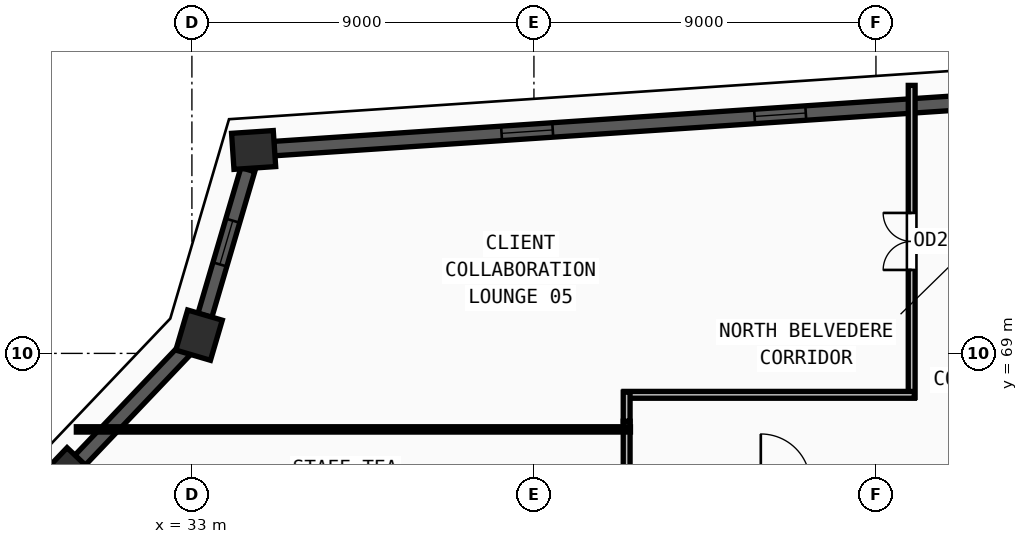
"""IFC4 building model, lengths in metres.
Left out: names, types, materials, properties, quantities, classifications, styles, units other than length and angle.
Written with IfcOpenShell. Run it as: python <this file> out.ifc"""

import sys

from ifc_helpers import new_model, si_unit, direction, frame, frame_2d, origin, origin_2d, place, context, subcontext, project, spatial, rectangle, extrude, source, transform, mapped, element, fill, save


model = new_model("IFC4")
c1 = context("Model", 3, precision=1e-05, world=origin(), true_north=direction((0.0, 1.0)))
c2 = subcontext(c1, "Body", "Model", "MODEL_VIEW")
j1 = project(units=[si_unit("LENGTHUNIT", "METRE"), si_unit("PLANEANGLEUNIT", "RADIAN")], contexts=[c1])
p1 = place(None, origin())
s1 = spatial("IfcSite", under=j1, at=p1, CompositionType="ELEMENT")
p2 = place(p1, origin())
s2 = spatial("IfcBuilding", under=s1, at=p2, CompositionType="ELEMENT")
p3 = place(p2, frame((0.0, 0.0, 297.75)))
s3 = spatial("IfcBuildingStorey", under=s2, at=p3, CompositionType="ELEMENT", Elevation=297.75)
m1 = source(origin(), c2, "Body", "SweptSolid", [
    extrude(rectangle(XDim=1.1, YDim=0.95, at=origin_2d()), origin(), (0.0, 0.0, 1.0), 3.75),
])
for number, where, z_axis, x_axis in (
    (1, (29.68, 65.793, 0.0), (0.0, 0.0, 1.0), (0.689, 0.724, 0.0)),
    (2, (33.188, 69.48, 0.0), (0.0, 0.0, 1.0), (0.283, 0.959, 0.0)),
    (3, (34.624, 74.353, 0.0), (0.0, 0.0, 1.0), (0.998, 0.067, 0.0)),
):
    element("IfcColumn", number, at=place(p3, frame(where, z_axis=z_axis, x_axis=x_axis)), inside=s3, PredefinedType="COLUMN", context=c2, shape_type="MappedRepresentation", body=[
        mapped(m1, transform((0.0, 0.0, 0.0), x_axis=(1.0, 0.0, 0.0), y_axis=(0.0, 1.0, 0.0), z_axis=(0.0, 0.0, 1.0), scale=1.0)),
    ])
p4 = place(p3, frame((61.797, 76.17, 0.0), z_axis=(0.0, 0.0, 1.0), x_axis=(-0.99777170169, -0.066720546358, 0.0)))
e4 = element("IfcWall", 4, at=p4, inside=s3, PredefinedType="SOLIDWALL", context=c2, shape_type="SweptSolid", body=[
    extrude(rectangle(XDim=26.694, YDim=0.38, at=frame_2d((13.347, 0.0))), origin(), (0.0, 0.0, 1.0), 3.57),
])
m2 = source(origin(), c2, "Body", "SweptSolid", [
    extrude(rectangle(XDim=1.35, YDim=1.85, at=frame_2d((0.675, 0.925))), frame((0.0, 0.2, 0.0), z_axis=(0.0, -1.0, 0.0), x_axis=(1.0, 0.0, 0.0)), (0.0, 0.0, 1.0), 0.4),
])
p5 = place(p4, frame((5.148, 0.0, 0.55)))
e5 = element("IfcOpeningElement", 5, at=p5, cuts=e4, PredefinedType="OPENING", context=c2, shape_type="MappedRepresentation", body=[
    mapped(m2, transform((0.0, 0.0, 0.0), x_axis=(1.0, 0.0, 0.0), y_axis=(0.0, 1.0, 0.0), z_axis=(0.0, 0.0, 1.0), scale=1.0)),
])
p6 = place(p4, frame((12.672, 0.0, 0.55)))
e6 = element("IfcOpeningElement", 6, at=p6, cuts=e4, PredefinedType="OPENING", context=c2, shape_type="MappedRepresentation", body=[
    mapped(m2, transform((0.0, 0.0, 0.0), x_axis=(1.0, 0.0, 0.0), y_axis=(0.0, 1.0, 0.0), z_axis=(0.0, 0.0, 1.0), scale=1.0)),
])
p7 = place(p4, frame((19.345, 0.0, 0.55)))
e7 = element("IfcOpeningElement", 7, at=p7, cuts=e4, PredefinedType="OPENING", context=c2, shape_type="MappedRepresentation", body=[
    mapped(m2, transform((0.0, 0.0, 0.0), x_axis=(1.0, 0.0, 0.0), y_axis=(0.0, 1.0, 0.0), z_axis=(0.0, 0.0, 1.0), scale=1.0)),
])
p8 = place(p3, frame((34.471, 73.835, 0.0), z_axis=(0.0, 0.0, 1.0), x_axis=(-0.282483550301, -0.959272142726, 0.0)))
e8 = element("IfcWall", 8, at=p8, inside=s3, PredefinedType="SOLIDWALL", context=c2, shape_type="SweptSolid", body=[
    extrude(rectangle(XDim=4.0, YDim=0.38, at=frame_2d((2.0, 0.0))), origin(), (0.0, 0.0, 1.0), 3.57),
])
m3 = source(origin(), c2, "Body", "SweptSolid", [
    extrude(rectangle(XDim=1.2, YDim=1.9, at=frame_2d((0.6, 0.95))), frame((0.0, 0.2, 0.0), z_axis=(0.0, -1.0, 0.0), x_axis=(1.0, 0.0, 0.0)), (0.0, 0.0, 1.0), 0.4),
])
p9 = place(p8, frame((1.4, 0.0, 0.55)))
e9 = element("IfcOpeningElement", 9, at=p9, cuts=e8, PredefinedType="OPENING", context=c2, shape_type="MappedRepresentation", body=[
    mapped(m3, transform((0.0, 0.0, 0.0), x_axis=(1.0, 0.0, 0.0), y_axis=(0.0, 1.0, 0.0), z_axis=(0.0, 0.0, 1.0), scale=1.0)),
])
p10 = place(p3, frame((32.816, 69.089, 0.0), z_axis=(0.0, 0.0, 1.0), x_axis=(-0.689291723618, -0.72448389889, 0.0)))
e10 = element("IfcWall", 10, at=p10, inside=s3, PredefinedType="SOLIDWALL", context=c2, shape_type="SweptSolid", body=[
    extrude(rectangle(XDim=4.01, YDim=0.38, at=frame_2d((2.005, 0.0))), origin(), (0.0, 0.0, 1.0), 3.57),
])
p11 = place(p3, frame((51.94, 67.84, 0.0), z_axis=(0.0, 0.0, 1.0), x_axis=(0.0, 1.0, 0.0)))
e11 = element("IfcWall", 11, at=p11, inside=s3, PredefinedType="PARTITIONING", context=c2, shape_type="SweptSolid", body=[
    extrude(rectangle(XDim=8.212, YDim=0.18, at=frame_2d((4.106, 0.0))), origin(), (0.0, 0.0, 1.0), 3.57),
])
m4 = source(origin(), c2, "Body", "SweptSolid", [
    extrude(rectangle(XDim=1.5, YDim=2.2, at=frame_2d((0.75, 1.1))), frame((0.0, 0.1, 0.0), z_axis=(0.0, -1.0, 0.0), x_axis=(1.0, 0.0, 0.0)), (0.0, 0.0, 1.0), 0.2),
])
p12 = place(p11, frame((3.356, 0.0, 0.0)))
e12 = element("IfcOpeningElement", 12, at=p12, cuts=e11, PredefinedType="OPENING", context=c2, shape_type="MappedRepresentation", body=[
    mapped(m4, transform((0.0, 0.0, 0.0), x_axis=(1.0, 0.0, 0.0), y_axis=(0.0, 1.0, 0.0), z_axis=(0.0, 0.0, 1.0), scale=1.0)),
])
p13 = place(p3, frame((44.44, 63.285, 0.0), z_axis=(0.0, 0.0, 1.0), x_axis=(0.0, 1.0, 0.0)))
e13 = element("IfcWall", 13, at=p13, inside=s3, PredefinedType="PARTITIONING", context=c2, shape_type="SweptSolid", body=[
    extrude(rectangle(XDim=3.93, YDim=0.18, at=frame_2d((1.965, 0.0))), origin(), (0.0, 0.0, 1.0), 3.57),
])
m5 = source(origin(), c2, "Body", "SweptSolid", [
    extrude(rectangle(XDim=1.0, YDim=2.2, at=frame_2d((0.5, 1.1))), frame((0.0, 0.1, 0.0), z_axis=(0.0, -1.0, 0.0), x_axis=(1.0, 0.0, 0.0)), (0.0, 0.0, 1.0), 0.2),
])
p14 = place(p13, frame((1.465, 0.0, 0.0)))
e14 = element("IfcOpeningElement", 14, at=p14, cuts=e13, PredefinedType="OPENING", context=c2, shape_type="MappedRepresentation", body=[
    mapped(m5, transform((0.0, 0.0, 0.0), x_axis=(1.0, 0.0, 0.0), y_axis=(0.0, 1.0, 0.0), z_axis=(0.0, 0.0, 1.0), scale=1.0)),
])
p15 = place(p3, frame((44.37, 67.91, 0.0), z_axis=(0.0, 0.0, 1.0), x_axis=(1.0, 0.0, 0.0)))
e15 = element("IfcWall", 15, at=p15, inside=s3, PredefinedType="PARTITIONING", context=c2, shape_type="SweptSolid", body=[
    extrude(rectangle(XDim=7.64, YDim=0.18, at=frame_2d((3.82, 0.0))), origin(), (0.0, 0.0, 1.0), 3.57),
])
p16 = place(p3, frame((44.44, 67.215, 0.0), z_axis=(0.0, 0.0, 1.0), x_axis=(0.0, 1.0, 0.0)))
e16 = element("IfcWall", 16, at=p16, inside=s3, PredefinedType="PARTITIONING", context=c2, shape_type="SweptSolid", body=[
    extrude(rectangle(XDim=0.765, YDim=0.18, at=frame_2d((0.382, 0.0))), origin(), (0.0, 0.0, 1.0), 3.57),
])
p17 = place(p3, frame((44.54, 67.0, 0.0), z_axis=(0.0, 0.0, 1.0), x_axis=(-1.0, 0.0, 0.0)))
e17 = element("IfcWall", 17, at=p17, inside=s3, PredefinedType="PARTITIONING", context=c2, shape_type="SweptSolid", body=[
    extrude(rectangle(XDim=14.581, YDim=0.14, at=frame_2d((7.291, 0.0))), origin(), (0.0, 0.0, 1.0), 3.57),
])
m6 = source(origin(), c2, "Body", "SweptSolid", [
    extrude(rectangle(XDim=1.35, YDim=1.85, at=frame_2d((0.675, 0.925))), frame((0.0, 0.03, 0.0), z_axis=(0.0, -1.0, 0.0), x_axis=(1.0, 0.0, 0.0)), (0.0, 0.0, 1.0), 0.06),
])
p18 = place(p6, origin())
e18 = element("IfcWindow", 18, at=p18, inside=s3, PartitioningType="SINGLE_PANEL", PredefinedType="WINDOW", context=c2, shape_type="MappedRepresentation", body=[
    mapped(m6, transform((0.0, 0.0, 0.0), x_axis=(1.0, 0.0, 0.0), y_axis=(0.0, 1.0, 0.0), z_axis=(0.0, 0.0, 1.0), scale=1.0)),
])
fill(e6, e18)
p19 = place(p7, origin())
e19 = element("IfcWindow", 19, at=p19, inside=s3, PartitioningType="SINGLE_PANEL", PredefinedType="WINDOW", context=c2, shape_type="MappedRepresentation", body=[
    mapped(m6, transform((0.0, 0.0, 0.0), x_axis=(1.0, 0.0, 0.0), y_axis=(0.0, 1.0, 0.0), z_axis=(0.0, 0.0, 1.0), scale=1.0)),
])
fill(e7, e19)
m7 = source(origin(), c2, "Body", "SweptSolid", [
    extrude(rectangle(XDim=1.2, YDim=1.9, at=frame_2d((0.6, 0.95))), frame((0.0, 0.03, 0.0), z_axis=(0.0, -1.0, 0.0), x_axis=(1.0, 0.0, 0.0)), (0.0, 0.0, 1.0), 0.06),
])
p20 = place(p9, origin())
e20 = element("IfcWindow", 20, at=p20, inside=s3, PartitioningType="SINGLE_PANEL", PredefinedType="WINDOW", context=c2, shape_type="MappedRepresentation", body=[
    mapped(m7, transform((0.0, 0.0, 0.0), x_axis=(1.0, 0.0, 0.0), y_axis=(0.0, 1.0, 0.0), z_axis=(0.0, 0.0, 1.0), scale=1.0)),
])
fill(e9, e20)
m8 = source(origin(), c2, "Body", "SweptSolid", [
    extrude(rectangle(XDim=1.5, YDim=2.2, at=frame_2d((0.75, 1.1))), frame((0.0, 0.025, 0.0), z_axis=(0.0, -1.0, 0.0), x_axis=(1.0, 0.0, 0.0)), (0.0, 0.0, 1.0), 0.05),
])
p21 = place(p12, origin())
e21 = element("IfcDoor", 21, at=p21, inside=s3, OperationType="DOUBLE_DOOR_SINGLE_SWING", PredefinedType="DOOR", context=c2, shape_type="MappedRepresentation", body=[
    mapped(m8, transform((0.0, 0.0, 0.0), x_axis=(1.0, 0.0, 0.0), y_axis=(0.0, 1.0, 0.0), z_axis=(0.0, 0.0, 1.0), scale=1.0)),
])
fill(e12, e21)
save(model, sys.argv[1])
